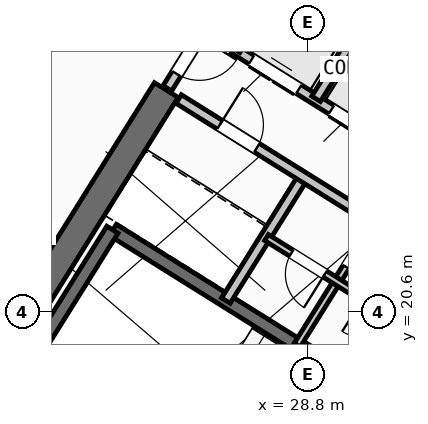
"""IFC4 building model, lengths in metres.
Left out: names, types, materials, properties, quantities, classifications, styles, units other than length and angle.
Written with IfcOpenShell. Run it as: python <this file> out.ifc"""

import sys

from ifc_helpers import new_model, si_unit, direction, frame, frame_2d, origin, place, context, subcontext, project, spatial, rectangle, extrude, source, transform, mapped, element, fill, save


model = new_model("IFC4")
c1 = context("Model", 3, precision=1e-05, world=origin(), true_north=direction((0.0, 1.0)))
c2 = subcontext(c1, "Body", "Model", "MODEL_VIEW")
j1 = project(units=[si_unit("LENGTHUNIT", "METRE"), si_unit("PLANEANGLEUNIT", "RADIAN")], contexts=[c1])
p1 = place(None, origin())
s1 = spatial("IfcSite", under=j1, at=p1, CompositionType="ELEMENT")
p2 = place(p1, origin())
s2 = spatial("IfcBuilding", under=s1, at=p2, CompositionType="ELEMENT")
p3 = place(p2, frame((0.0, 0.0, 151.5)))
s3 = spatial("IfcBuildingStorey", under=s2, at=p3, CompositionType="ELEMENT", Elevation=151.5)
p4 = place(p3, frame((40.573, 24.01, 0.0), z_axis=(0.0, 0.0, 1.0), x_axis=(-0.848047359947, 0.529920442413, 0.0)))
e1 = element("IfcWall", 1, at=p4, inside=s3, PredefinedType="SHEAR", context=c2, shape_type="SweptSolid", body=[
    extrude(rectangle(XDim=13.14, YDim=0.55, at=frame_2d((6.57, 0.0))), origin(), (0.0, 0.0, 1.0), 3.35),
])
p5 = place(p3, frame((26.007, 24.976, 0.0), z_axis=(0.0, 0.0, 1.0), x_axis=(-0.529923795287, -0.848045264823, 0.0)))
e2 = element("IfcWall", 2, at=p5, inside=s3, PredefinedType="SHEAR", context=c2, shape_type="SweptSolid", body=[
    extrude(rectangle(XDim=6.425, YDim=0.55, at=frame_2d((3.212, 0.0))), origin(), (0.0, 0.0, 1.0), 3.35),
])
p6 = place(p3, frame((29.268, 6.429, 0.0), z_axis=(0.0, 0.0, 1.0), x_axis=(-0.848049971435, 0.529916263149, 0.0)))
e3 = element("IfcWall", 3, at=p6, inside=s3, PredefinedType="STANDARD", context=c2, shape_type="SweptSolid", body=[
    extrude(rectangle(XDim=31.588, YDim=0.32, at=frame_2d((15.794, 0.0))), origin(), (0.0, 0.0, 1.0), 3.35),
])
p7 = place(p6, frame((16.362, 0.0, 0.0)))
e4 = element("IfcOpeningElement", 4, at=p7, cuts=e3, PredefinedType="OPENING", context=c2, shape_type="SweptSolid", body=[
    extrude(rectangle(XDim=1.2, YDim=2.15, at=frame_2d((0.6, 1.075))), frame((0.0, 0.17, 0.0), z_axis=(0.0, -1.0, 0.0), x_axis=(1.0, 0.0, 0.0)), (0.0, 0.0, 1.0), 0.34),
])
p8 = place(p6, frame((2.989, 0.0, 0.8)))
e5 = element("IfcOpeningElement", 5, at=p8, cuts=e3, PredefinedType="OPENING", context=c2, shape_type="SweptSolid", body=[
    extrude(rectangle(XDim=2.1, YDim=1.55, at=frame_2d((1.05, 0.775))), frame((0.0, 0.17, 0.0), z_axis=(0.0, -1.0, 0.0), x_axis=(1.0, 0.0, 0.0)), (0.0, 0.0, 1.0), 0.34),
])
p9 = place(p6, frame((8.359, 0.0, 0.8)))
e6 = element("IfcOpeningElement", 6, at=p9, cuts=e3, PredefinedType="OPENING", context=c2, shape_type="SweptSolid", body=[
    extrude(rectangle(XDim=2.1, YDim=1.55, at=frame_2d((1.05, 0.775))), frame((0.0, 0.17, 0.0), z_axis=(0.0, -1.0, 0.0), x_axis=(1.0, 0.0, 0.0)), (0.0, 0.0, 1.0), 0.34),
])
p10 = place(p6, frame((13.284, 0.0, 0.95)))
e7 = element("IfcOpeningElement", 7, at=p10, cuts=e3, PredefinedType="OPENING", context=c2, shape_type="SweptSolid", body=[
    extrude(rectangle(XDim=1.2, YDim=1.4, at=frame_2d((0.6, 0.7))), frame((0.0, 0.17, 0.0), z_axis=(0.0, -1.0, 0.0), x_axis=(1.0, 0.0, 0.0)), (0.0, 0.0, 1.0), 0.34),
])
p11 = place(p6, frame((20.259, 0.0, 0.95)))
e8 = element("IfcOpeningElement", 8, at=p11, cuts=e3, PredefinedType="OPENING", context=c2, shape_type="SweptSolid", body=[
    extrude(rectangle(XDim=1.2, YDim=1.4, at=frame_2d((0.6, 0.7))), frame((0.0, 0.17, 0.0), z_axis=(0.0, -1.0, 0.0), x_axis=(1.0, 0.0, 0.0)), (0.0, 0.0, 1.0), 0.34),
])
p12 = place(p6, frame((22.929, 0.0, 0.95)))
e9 = element("IfcOpeningElement", 9, at=p12, cuts=e3, PredefinedType="OPENING", context=c2, shape_type="SweptSolid", body=[
    extrude(rectangle(XDim=1.2, YDim=1.4, at=frame_2d((0.6, 0.7))), frame((0.0, 0.17, 0.0), z_axis=(0.0, -1.0, 0.0), x_axis=(1.0, 0.0, 0.0)), (0.0, 0.0, 1.0), 0.34),
])
p13 = place(p6, frame((27.481, 0.0, 0.8)))
e10 = element("IfcOpeningElement", 10, at=p13, cuts=e3, PredefinedType="OPENING", context=c2, shape_type="SweptSolid", body=[
    extrude(rectangle(XDim=2.1, YDim=1.55, at=frame_2d((1.05, 0.775))), frame((0.0, 0.17, 0.0), z_axis=(0.0, -1.0, 0.0), x_axis=(1.0, 0.0, 0.0)), (0.0, 0.0, 1.0), 0.34),
])
p14 = place(p3, frame((14.138, 41.825, 0.0), z_axis=(0.0, 0.0, 1.0), x_axis=(0.848046498049, -0.529921821731, 0.0)))
e11 = element("IfcWall", 11, at=p14, inside=s3, PredefinedType="STANDARD", context=c2, shape_type="SweptSolid", body=[
    extrude(rectangle(XDim=31.588, YDim=0.32, at=frame_2d((15.794, 0.0))), origin(), (0.0, 0.0, 1.0), 3.35),
])
p15 = place(p14, frame((9.792, 0.0, 0.0)))
e12 = element("IfcOpeningElement", 12, at=p15, cuts=e11, PredefinedType="OPENING", context=c2, shape_type="SweptSolid", body=[
    extrude(rectangle(XDim=1.05, YDim=2.15, at=frame_2d((0.525, 1.075))), frame((0.0, 0.17, 0.0), z_axis=(0.0, -1.0, 0.0), x_axis=(1.0, 0.0, 0.0)), (0.0, 0.0, 1.0), 0.34),
])
p16 = place(p14, frame((0.791, 0.0, 0.85)))
e13 = element("IfcOpeningElement", 13, at=p16, cuts=e11, PredefinedType="OPENING", context=c2, shape_type="SweptSolid", body=[
    extrude(rectangle(XDim=1.8, YDim=1.5, at=frame_2d((0.9, 0.75))), frame((0.0, 0.17, 0.0), z_axis=(0.0, -1.0, 0.0), x_axis=(1.0, 0.0, 0.0)), (0.0, 0.0, 1.0), 0.34),
])
p17 = place(p14, frame((3.996, 0.0, 0.95)))
e14 = element("IfcOpeningElement", 14, at=p17, cuts=e11, PredefinedType="OPENING", context=c2, shape_type="SweptSolid", body=[
    extrude(rectangle(XDim=1.2, YDim=1.4, at=frame_2d((0.6, 0.7))), frame((0.0, 0.17, 0.0), z_axis=(0.0, -1.0, 0.0), x_axis=(1.0, 0.0, 0.0)), (0.0, 0.0, 1.0), 0.34),
])
p18 = place(p14, frame((13.874, 0.0, 0.85)))
e15 = element("IfcOpeningElement", 15, at=p18, cuts=e11, PredefinedType="OPENING", context=c2, shape_type="SweptSolid", body=[
    extrude(rectangle(XDim=1.5, YDim=1.5, at=frame_2d((0.75, 0.75))), frame((0.0, 0.17, 0.0), z_axis=(0.0, -1.0, 0.0), x_axis=(1.0, 0.0, 0.0)), (0.0, 0.0, 1.0), 0.34),
])
p19 = place(p14, frame((17.104, 0.0, 1.0)))
e16 = element("IfcOpeningElement", 16, at=p19, cuts=e11, PredefinedType="OPENING", context=c2, shape_type="SweptSolid", body=[
    extrude(rectangle(XDim=0.9, YDim=1.25, at=frame_2d((0.45, 0.625))), frame((0.0, 0.17, 0.0), z_axis=(0.0, -1.0, 0.0), x_axis=(1.0, 0.0, 0.0)), (0.0, 0.0, 1.0), 0.34),
])
p20 = place(p14, frame((22.069, 0.0, 1.0)))
e17 = element("IfcOpeningElement", 17, at=p20, cuts=e11, PredefinedType="OPENING", context=c2, shape_type="SweptSolid", body=[
    extrude(rectangle(XDim=0.9, YDim=1.25, at=frame_2d((0.45, 0.625))), frame((0.0, 0.17, 0.0), z_axis=(0.0, -1.0, 0.0), x_axis=(1.0, 0.0, 0.0)), (0.0, 0.0, 1.0), 0.34),
])
p21 = place(p14, frame((27.519, 0.0, 1.0)))
e18 = element("IfcOpeningElement", 18, at=p21, cuts=e11, PredefinedType="OPENING", context=c2, shape_type="SweptSolid", body=[
    extrude(rectangle(XDim=0.9, YDim=1.25, at=frame_2d((0.45, 0.625))), frame((0.0, 0.17, 0.0), z_axis=(0.0, -1.0, 0.0), x_axis=(1.0, 0.0, 0.0)), (0.0, 0.0, 1.0), 0.34),
])
p22 = place(p3, frame((31.28, 18.261, 0.0), z_axis=(0.0, 0.0, 1.0), x_axis=(-0.848051618787, 0.529913626805, 0.0)))
e19 = element("IfcWall", 19, at=p22, inside=s3, PredefinedType="SHEAR", context=c2, shape_type="SweptSolid", body=[
    extrude(rectangle(XDim=7.46, YDim=0.26, at=frame_2d((3.73, 0.0))), origin(), (0.0, 0.0, 1.0), 3.35),
])
p23 = place(p22, frame((0.36, 0.0, 0.0)))
e20 = element("IfcOpeningElement", 20, at=p23, cuts=e19, PredefinedType="OPENING", context=c2, shape_type="SweptSolid", body=[
    extrude(rectangle(XDim=0.86, YDim=2.05, at=frame_2d((0.43, 1.025))), frame((0.0, 0.14, 0.0), z_axis=(0.0, -1.0, 0.0), x_axis=(1.0, 0.0, 0.0)), (0.0, 0.0, 1.0), 0.28),
])
p24 = place(p3, frame((24.945, 22.22, 0.0), z_axis=(0.0, 0.0, 1.0), x_axis=(-0.529908658664, -0.84805472316, 0.0)))
e21 = element("IfcWall", 21, at=p24, inside=s3, PredefinedType="SHEAR", context=c2, shape_type="SweptSolid", body=[
    extrude(rectangle(XDim=3.16, YDim=0.26, at=frame_2d((1.58, 0.0))), origin(), (0.0, 0.0, 1.0), 3.35),
])
p25 = place(p3, frame((31.822, 24.998, 0.0), z_axis=(0.0, 0.0, 1.0), x_axis=(-0.848036912365, 0.52993716162, 0.0)))
e22 = element("IfcWall", 22, at=p25, inside=s3, PredefinedType="STANDARD", context=c2, shape_type="SweptSolid", body=[
    extrude(rectangle(XDim=4.618, YDim=0.2, at=frame_2d((2.309, 0.0))), origin(), (0.0, 0.0, 1.0), 3.34),
])
p26 = place(p3, frame((32.108, 22.814, 0.0), z_axis=(0.0, 0.0, 1.0), x_axis=(-0.848042229521, 0.529928652696, 0.0)))
e23 = element("IfcWall", 23, at=p26, inside=s3, PredefinedType="STANDARD", context=c2, shape_type="SweptSolid", body=[
    extrude(rectangle(XDim=5.62, YDim=0.2, at=frame_2d((2.81, 0.0))), origin(), (0.0, 0.0, 1.0), 3.34),
])
p27 = place(p26, frame((0.39, 0.0, 0.0)))
e24 = element("IfcOpeningElement", 24, at=p27, cuts=e23, PredefinedType="OPENING", context=c2, shape_type="SweptSolid", body=[
    extrude(rectangle(XDim=1.1, YDim=2.15, at=frame_2d((0.55, 1.075))), frame((0.0, 0.11, 0.0), z_axis=(0.0, -1.0, 0.0), x_axis=(1.0, 0.0, 0.0)), (0.0, 0.0, 1.0), 0.22),
])
p28 = place(p26, frame((2.25, 0.0, 0.0)))
e25 = element("IfcOpeningElement", 25, at=p28, cuts=e23, PredefinedType="OPENING", context=c2, shape_type="SweptSolid", body=[
    extrude(rectangle(XDim=1.1, YDim=2.15, at=frame_2d((0.55, 1.075))), frame((0.0, 0.11, 0.0), z_axis=(0.0, -1.0, 0.0), x_axis=(1.0, 0.0, 0.0)), (0.0, 0.0, 1.0), 0.22),
])
p29 = place(p26, frame((4.11, 0.0, 0.0)))
e26 = element("IfcOpeningElement", 26, at=p29, cuts=e23, PredefinedType="OPENING", context=c2, shape_type="SweptSolid", body=[
    extrude(rectangle(XDim=1.1, YDim=2.15, at=frame_2d((0.55, 1.075))), frame((0.0, 0.11, 0.0), z_axis=(0.0, -1.0, 0.0), x_axis=(1.0, 0.0, 0.0)), (0.0, 0.0, 1.0), 0.22),
])
p30 = place(p3, frame((28.25, 27.17, 0.0), z_axis=(0.0, 0.0, 1.0), x_axis=(-0.529905827651, -0.848056492117, 0.0)))
e27 = element("IfcWall", 27, at=p30, inside=s3, PredefinedType="STANDARD", context=c2, shape_type="SweptSolid", body=[
    extrude(rectangle(XDim=1.65, YDim=0.2, at=frame_2d((0.825, 0.0))), origin(), (0.0, 0.0, 1.0), 3.34),
])
p31 = place(p3, frame((29.801, 26.142, 0.0), z_axis=(0.0, 0.0, 1.0), x_axis=(-0.529998940003, -0.847998304005, 0.0)))
e28 = element("IfcWall", 28, at=p31, inside=s3, PredefinedType="STANDARD", context=c2, shape_type="SweptSolid", body=[
    extrude(rectangle(XDim=1.58, YDim=0.2, at=frame_2d((0.79, 0.0))), origin(), (0.0, 0.0, 1.0), 3.34),
])
p32 = place(p3, frame((28.71, 23.263, 0.0), z_axis=(0.0, 0.0, 1.0), x_axis=(-0.529907497854, -0.848055448493, 0.0)))
e29 = element("IfcWall", 29, at=p32, inside=s3, PredefinedType="STANDARD", context=c2, shape_type="SweptSolid", body=[
    extrude(rectangle(XDim=2.88, YDim=0.2, at=frame_2d((1.44, 0.0))), origin(), (0.0, 0.0, 1.0), 3.34),
])
p33 = place(p3, frame((31.525, 21.504, 0.0), z_axis=(0.0, 0.0, 1.0), x_axis=(-0.848040211232, 0.529931882541, 0.0)))
e30 = element("IfcWall", 30, at=p33, inside=s3, PredefinedType="STANDARD", context=c2, shape_type="SweptSolid", body=[
    extrude(rectangle(XDim=6.218, YDim=0.2, at=frame_2d((3.109, 0.0))), origin(), (0.0, 0.0, 1.0), 3.34),
])
p34 = place(p33, frame((4.4, 0.0, 0.0)))
e31 = element("IfcOpeningElement", 31, at=p34, cuts=e30, PredefinedType="OPENING", context=c2, shape_type="SweptSolid", body=[
    extrude(rectangle(XDim=0.86, YDim=2.05, at=frame_2d((0.43, 1.025))), frame((0.0, 0.11, 0.0), z_axis=(0.0, -1.0, 0.0), x_axis=(1.0, 0.0, 0.0)), (0.0, 0.0, 1.0), 0.22),
])
p35 = place(p33, frame((0.35, 0.0, 0.0)))
e32 = element("IfcOpeningElement", 32, at=p35, cuts=e30, PredefinedType="OPENING", context=c2, shape_type="SweptSolid", body=[
    extrude(rectangle(XDim=0.86, YDim=2.05, at=frame_2d((0.43, 1.025))), frame((0.0, 0.11, 0.0), z_axis=(0.0, -1.0, 0.0), x_axis=(1.0, 0.0, 0.0)), (0.0, 0.0, 1.0), 0.22),
])
p36 = place(p3, frame((30.117, 22.384, 0.0), z_axis=(0.0, 0.0, 1.0), x_axis=(-0.529951914384, -0.848027693204, 0.0)))
e33 = element("IfcWall", 33, at=p36, inside=s3, PredefinedType="PLUMBINGWALL", context=c2, shape_type="SweptSolid", body=[
    extrude(rectangle(XDim=1.4, YDim=0.14, at=frame_2d((0.7, 0.0))), origin(), (0.0, 0.0, 1.0), 3.34),
])
p37 = place(p36, frame((0.28, 0.0, 0.0)))
e34 = element("IfcOpeningElement", 34, at=p37, cuts=e33, PredefinedType="OPENING", context=c2, shape_type="SweptSolid", body=[
    extrude(rectangle(XDim=0.78, YDim=2.05, at=frame_2d((0.39, 1.025))), frame((0.0, 0.08, 0.0), z_axis=(0.0, -1.0, 0.0), x_axis=(1.0, 0.0, 0.0)), (0.0, 0.0, 1.0), 0.16),
])
p38 = place(p3, frame((29.375, 21.196, 0.0), z_axis=(0.0, 0.0, 1.0), x_axis=(-0.529865479138, -0.848081702443, 0.0)))
e35 = element("IfcWall", 35, at=p38, inside=s3, PredefinedType="PLUMBINGWALL", context=c2, shape_type="SweptSolid", body=[
    extrude(rectangle(XDim=1.48, YDim=0.14, at=frame_2d((0.74, 0.0))), origin(), (0.0, 0.0, 1.0), 3.34),
])
p39 = place(p3, frame((30.766, 20.327, 0.0), z_axis=(0.0, 0.0, 1.0), x_axis=(-0.848052663127, 0.529911955482, 0.0)))
e36 = element("IfcWall", 36, at=p39, inside=s3, PredefinedType="PLUMBINGWALL", context=c2, shape_type="SweptSolid", body=[
    extrude(rectangle(XDim=3.28, YDim=0.14, at=frame_2d((1.64, 0.0))), origin(), (0.0, 0.0, 1.0), 3.34),
])
p40 = place(p39, frame((0.25, 0.0, 0.0)))
e37 = element("IfcOpeningElement", 37, at=p40, cuts=e36, PredefinedType="OPENING", context=c2, shape_type="SweptSolid", body=[
    extrude(rectangle(XDim=0.78, YDim=2.05, at=frame_2d((0.39, 1.025))), frame((0.0, 0.08, 0.0), z_axis=(0.0, -1.0, 0.0), x_axis=(1.0, 0.0, 0.0)), (0.0, 0.0, 1.0), 0.16),
])
p41 = place(p39, frame((1.92, 0.0, 0.0)))
e38 = element("IfcOpeningElement", 38, at=p41, cuts=e36, PredefinedType="OPENING", context=c2, shape_type="SweptSolid", body=[
    extrude(rectangle(XDim=0.78, YDim=2.05, at=frame_2d((0.39, 1.025))), frame((0.0, 0.08, 0.0), z_axis=(0.0, -1.0, 0.0), x_axis=(1.0, 0.0, 0.0)), (0.0, 0.0, 1.0), 0.16),
])
p42 = place(p3, frame((27.596, 27.52, 0.0), z_axis=(0.0, 0.0, 1.0), x_axis=(-0.529865479138, -0.848081702443, 0.0)))
e39 = element("IfcWall", 39, at=p42, inside=s3, PredefinedType="STANDARD", context=c2, shape_type="SweptSolid", body=[
    extrude(rectangle(XDim=2.96, YDim=0.2, at=frame_2d((1.48, 0.0))), origin(), (0.0, 0.0, 1.0), 3.34),
])
p43 = place(p42, frame((1.76, 0.0, 0.0)))
e40 = element("IfcOpeningElement", 40, at=p43, cuts=e39, PredefinedType="OPENING", context=c2, shape_type="SweptSolid", body=[
    extrude(rectangle(XDim=0.86, YDim=2.05, at=frame_2d((0.43, 1.025))), frame((0.0, 0.11, 0.0), z_axis=(0.0, -1.0, 0.0), x_axis=(1.0, 0.0, 0.0)), (0.0, 0.0, 1.0), 0.22),
])
p44 = place(p3, frame((27.953, 33.016, 0.0), z_axis=(0.0, 0.0, 1.0), x_axis=(-0.529905022231, -0.848056995381, 0.0)))
e41 = element("IfcWall", 41, at=p44, inside=s3, PredefinedType="PARTITIONING", context=c2, shape_type="SweptSolid", body=[
    extrude(rectangle(XDim=11.45, YDim=0.16, at=frame_2d((5.725, 0.0))), origin(), (0.0, 0.0, 1.0), 3.34),
])
m1 = source(origin(), c2, "Body", "SweptSolid", [
    extrude(rectangle(XDim=1.1, YDim=2.15, at=frame_2d((0.55, 1.075))), frame((0.0, 0.025, 0.0), z_axis=(0.0, -1.0, 0.0), x_axis=(1.0, 0.0, 0.0)), (0.0, 0.0, 1.0), 0.05),
])
p45 = place(p28, origin())
e42 = element("IfcDoor", 42, at=p45, inside=s3, OperationType="DOUBLE_DOOR_SLIDING", PredefinedType="DOOR", context=c2, shape_type="MappedRepresentation", body=[
    mapped(m1, transform((0.0, 0.0, 0.0), scale=1.0)),
])
fill(e25, e42)
p46 = place(p29, origin())
e43 = element("IfcDoor", 43, at=p46, inside=s3, OperationType="DOUBLE_DOOR_SLIDING", PredefinedType="DOOR", context=c2, shape_type="MappedRepresentation", body=[
    mapped(m1, transform((0.0, 0.0, 0.0), scale=1.0)),
])
fill(e26, e43)
m2 = source(origin(), c2, "Body", "SweptSolid", [
    extrude(rectangle(XDim=0.86, YDim=2.05, at=frame_2d((0.43, 1.025))), frame((0.0, 0.025, 0.0), z_axis=(0.0, -1.0, 0.0), x_axis=(1.0, 0.0, 0.0)), (0.0, 0.0, 1.0), 0.05),
])
p47 = place(p34, frame((0.86, 0.0, 0.0), z_axis=(0.0, 0.0, 1.0), x_axis=(-1.0, 0.0, 0.0)))
e44 = element("IfcDoor", 44, at=p47, inside=s3, OperationType="SINGLE_SWING_LEFT", PredefinedType="DOOR", context=c2, shape_type="MappedRepresentation", body=[
    mapped(m2, transform((0.0, 0.0, 0.0), scale=1.0)),
])
fill(e31, e44)
m3 = source(origin(), c2, "Body", "SweptSolid", [
    extrude(rectangle(XDim=0.78, YDim=2.05, at=frame_2d((0.39, 1.025))), frame((0.0, 0.025, 0.0), z_axis=(0.0, -1.0, 0.0), x_axis=(1.0, 0.0, 0.0)), (0.0, 0.0, 1.0), 0.05),
])
p48 = place(p37, origin())
e45 = element("IfcDoor", 45, at=p48, inside=s3, OperationType="SINGLE_SWING_LEFT", PredefinedType="DOOR", context=c2, shape_type="MappedRepresentation", body=[
    mapped(m3, transform((0.0, 0.0, 0.0), scale=1.0)),
])
fill(e34, e45)
p49 = place(p41, origin())
e46 = element("IfcDoor", 46, at=p49, inside=s3, OperationType="SINGLE_SWING_LEFT", PredefinedType="DOOR", context=c2, shape_type="MappedRepresentation", body=[
    mapped(m3, transform((0.0, 0.0, 0.0), scale=1.0)),
])
fill(e38, e46)
p50 = place(p43, origin())
e47 = element("IfcDoor", 47, at=p50, inside=s3, OperationType="SINGLE_SWING_LEFT", PredefinedType="DOOR", context=c2, shape_type="MappedRepresentation", body=[
    mapped(m2, transform((0.0, 0.0, 0.0), scale=1.0)),
])
fill(e40, e47)
save(model, sys.argv[1])
